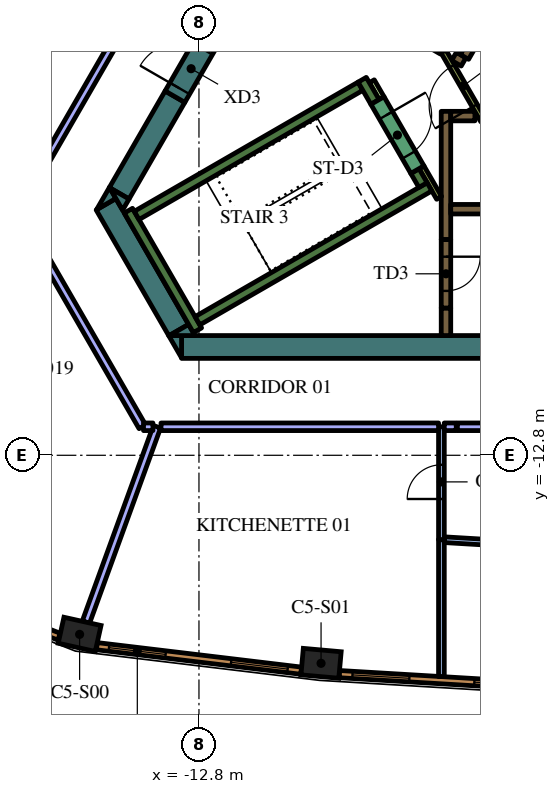
"""IFC4 building model, lengths in metres.
Left out: names, types, materials, properties, quantities, classifications, styles, units other than length and angle.
Written with IfcOpenShell. Run it as: python <this file> out.ifc"""

import sys

from ifc_helpers import new_model, si_unit, direction, frame, frame_2d, origin, origin_2d, place, context, subcontext, project, spatial, polyline, rectangle, outline, extrude, element, fill, save


model = new_model("IFC4")
c1 = context("Model", 3, precision=1e-05, world=origin(), true_north=direction((0.0, 1.0)))
c2 = subcontext(c1, "Body", "Model", "MODEL_VIEW")
j1 = project(units=[si_unit("LENGTHUNIT", "METRE"), si_unit("PLANEANGLEUNIT", "RADIAN")], contexts=[c1])
p1 = place(None, origin())
s1 = spatial("IfcSite", under=j1, at=p1, CompositionType="ELEMENT")
p2 = place(p1, origin())
s2 = spatial("IfcBuilding", under=s1, at=p2, CompositionType="ELEMENT")
p3 = place(p2, frame((0.0, 0.0, 279.6)))
s3 = spatial("IfcBuildingStorey", under=s2, at=p3, CompositionType="ELEMENT", Elevation=279.6)
for number, where, z_axis, x_axis in (
    (1, (-15.941, -17.512, 0.0), (0.0, 0.0, 1.0), (0.976, -0.217, 0.0)),
    (2, (-9.587, -18.274, 0.0), (0.0, 0.0, 1.0), (0.996, -0.089, 0.0)),
):
    element("IfcColumn", number, at=place(p3, frame(where, z_axis=z_axis, x_axis=x_axis)), inside=s3, PredefinedType="COLUMN", context=c2, shape_type="SweptSolid", body=[
        extrude(rectangle(XDim=1.0, YDim=0.7, at=origin_2d()), origin(), (0.0, 0.0, 1.0), 4.2),
    ])
p4 = place(p3, frame((8.904, -9.95, 0.0), z_axis=(0.0, 0.0, 1.0), x_axis=(-1.0, 0.0, 0.0)))
e3 = element("IfcWall", 3, at=p4, inside=s3, PredefinedType="SOLIDWALL", context=c2, shape_type="SweptSolid", body=[
    extrude(rectangle(XDim=22.161, YDim=0.6, at=frame_2d((11.081, 0.0))), origin(), (0.0, 0.0, 1.0), 4.2),
])
p5 = place(p3, origin())
e4 = element("IfcWall", 4, at=p5, inside=s3, PredefinedType="SOLIDWALL", context=c2, shape_type="SweptSolid", body=[
    extrude(outline(polyline([(-13.597, -9.65), (-13.259, -9.65), (-13.259, -10.236), (-13.597, -9.65)])), origin(), (0.0, 0.0, 1.0), 4.2),
])
p6 = place(p3, frame((-13.333, -9.506, 0.0), z_axis=(0.0, 0.0, 1.0), x_axis=(-0.500019073792, 0.866014391245, 0.0)))
e5 = element("IfcWall", 5, at=p6, inside=s3, PredefinedType="SOLIDWALL", context=c2, shape_type="SweptSolid", body=[
    extrude(rectangle(XDim=3.823, YDim=0.6, at=frame_2d((1.912, 0.0))), origin(), (0.0, 0.0, 1.0), 4.2),
])
e6 = element("IfcWall", 6, at=p5, inside=s3, PredefinedType="SOLIDWALL", context=c2, shape_type="SweptSolid", body=[
    extrude(outline(polyline([(-14.987, -6.043), (-15.493, -6.335), (-15.156, -5.75), (-14.987, -6.043)])), origin(), (0.0, 0.0, 1.0), 4.2),
])
e7 = element("IfcWall", 7, at=p5, inside=s3, PredefinedType="SOLIDWALL", context=c2, shape_type="SweptSolid", body=[
    extrude(outline(polyline([(-12.904, -9.65), (-13.58, -9.65), (-13.073, -9.357), (-12.904, -9.65)])), origin(), (0.0, 0.0, 1.0), 4.2),
])
p7 = place(p3, frame((-13.432, -3.364, 0.0), z_axis=(0.0, 0.0, 1.0), x_axis=(-0.499960127962, -0.866048422692, 0.0)))
e8 = element("IfcWall", 8, at=p7, inside=s3, PredefinedType="SOLIDWALL", context=c2, shape_type="SweptSolid", body=[
    extrude(rectangle(XDim=2.934, YDim=0.6, at=frame_2d((1.467, 0.0))), origin(), (0.0, 0.0, 1.0), 4.2),
])
e9 = element("IfcWall", 9, at=p5, inside=s3, PredefinedType="SOLIDWALL", context=c2, shape_type="SweptSolid", body=[
    extrude(outline(polyline([(-14.809, -6.35), (-15.147, -5.764), (-14.64, -6.057), (-14.809, -6.35)])), origin(), (0.0, 0.0, 1.0), 4.2),
])
p8 = place(p3, frame((-12.84, -9.511, 0.0), z_axis=(0.0, 0.0, 1.0), x_axis=(-0.499997733992, 0.866026712061, 0.0)))
e10 = element("IfcWall", 10, at=p8, inside=s3, PredefinedType="SOLIDWALL", context=c2, shape_type="SweptSolid", body=[
    extrude(rectangle(XDim=3.634, YDim=0.25, at=frame_2d((1.817, 0.0))), origin(), (0.0, 0.0, 1.0), 4.2),
])
p9 = place(p3, frame((-14.44, -6.49, 0.0), z_axis=(0.0, 0.0, 1.0), x_axis=(0.866022966069, 0.500004222222, 0.0)))
e11 = element("IfcWall", 11, at=p9, inside=s3, PredefinedType="SOLIDWALL", context=c2, shape_type="SweptSolid", body=[
    extrude(rectangle(XDim=6.8, YDim=0.25, at=frame_2d((3.4, 0.0))), origin(), (0.0, 0.0, 1.0), 4.2),
])
p10 = place(p3, frame((-8.168, -3.503, 0.0), z_axis=(0.0, 0.0, 1.0), x_axis=(-0.499952099219, 0.866053057547, 0.0)))
e12 = element("IfcWall", 12, at=p10, inside=s3, PredefinedType="SOLIDWALL", context=c2, shape_type="SweptSolid", body=[
    extrude(rectangle(XDim=0.675, YDim=0.25, at=frame_2d((0.337, 0.0))), origin(), (0.0, 0.0, 1.0), 4.2),
])
p11 = place(p3, frame((-12.84, -9.261, 0.0), z_axis=(0.0, 0.0, 1.0), x_axis=(0.866016039709, 0.500016218704, 0.0)))
e13 = element("IfcWall", 13, at=p11, inside=s3, PredefinedType="SOLIDWALL", context=c2, shape_type="SweptSolid", body=[
    extrude(rectangle(XDim=7.05, YDim=0.25, at=frame_2d((3.525, 0.0))), origin(), (0.0, 0.0, 1.0), 4.2),
])
p12 = place(p3, frame((-6.905, -5.69, 0.0), z_axis=(0.0, 0.0, 1.0), x_axis=(-0.500402024738, 0.865793170242, 0.0)))
e14 = element("IfcWall", 14, at=p12, inside=s3, PredefinedType="SOLIDWALL", context=c2, shape_type="SweptSolid", body=[
    extrude(rectangle(XDim=0.425, YDim=0.25, at=frame_2d((0.212, 0.0))), origin(), (0.0, 0.0, 1.0), 4.2),
])
p13 = place(p3, frame((-6.3, -7.125, 0.0), z_axis=(0.0, 0.0, 1.0), x_axis=(0.0, 1.0, 0.0)))
e15 = element("IfcWall", 15, at=p13, inside=s3, PredefinedType="SOLIDWALL", context=c2, shape_type="SweptSolid", body=[
    extrude(rectangle(XDim=3.375, YDim=0.25, at=frame_2d((1.687, 0.0))), origin(), (0.0, 0.0, 1.0), 4.2),
])
p14 = place(p3, frame((-6.175, -3.875, 0.0), z_axis=(0.0, 0.0, 1.0), x_axis=(1.0, 0.0, 0.0)))
e16 = element("IfcWall", 16, at=p14, inside=s3, PredefinedType="SOLIDWALL", context=c2, shape_type="SweptSolid", body=[
    extrude(rectangle(XDim=0.637, YDim=0.25, at=frame_2d((0.318, 0.0))), origin(), (0.0, 0.0, 1.0), 4.2),
])
p15 = place(p3, frame((-6.3, -8.925, 0.0), z_axis=(0.0, 0.0, 1.0), x_axis=(0.0, -1.0, 0.0)))
e17 = element("IfcWall", 17, at=p15, inside=s3, PredefinedType="SOLIDWALL", context=c2, shape_type="SweptSolid", body=[
    extrude(rectangle(XDim=0.725, YDim=0.25, at=frame_2d((0.363, 0.0))), origin(), (0.0, 0.0, 1.0), 4.2),
])
p16 = place(p3, frame((-6.088, -2.305, 0.0), z_axis=(0.0, 0.0, 1.0), x_axis=(0.866059450854, -0.499941024108, 0.0)))
e18 = element("IfcWall", 18, at=p16, inside=s3, PredefinedType="SOLIDWALL", context=c2, shape_type="SweptSolid", body=[
    extrude(rectangle(XDim=0.29, YDim=0.25, at=frame_2d((0.145, 0.0))), origin(), (0.0, 0.0, 1.0), 4.2),
])
p17 = place(p3, frame((-7.889, -1.265, 0.0), z_axis=(0.0, 0.0, 1.0), x_axis=(0.865986741702, -0.500066958712, 0.0)))
e19 = element("IfcWall", 19, at=p17, inside=s3, PredefinedType="SOLIDWALL", context=c2, shape_type="SweptSolid", body=[
    extrude(rectangle(XDim=1.738, YDim=0.25, at=frame_2d((0.869, 0.0))), origin(), (0.0, 0.0, 1.0), 4.2),
])
p18 = place(p3, frame((-8.252, -2.958, 0.0), z_axis=(0.0, 0.0, 1.0), x_axis=(0.500174715838, -0.865924508047, 0.0)))
e20 = element("IfcWall", 20, at=p18, inside=s3, PredefinedType="PARTITIONING", context=c2, shape_type="SweptSolid", body=[
    extrude(rectangle(XDim=0.514, YDim=0.15, at=frame_2d((0.257, 0.0))), origin(), (0.0, 0.0, 1.0), 3.55),
])
p19 = place(p3, frame((-6.48, -6.027, 0.0), z_axis=(0.0, 0.0, 1.0), x_axis=(-0.499927229454, 0.866067413802, 0.0)))
e21 = element("IfcWall", 21, at=p19, inside=s3, PredefinedType="PARTITIONING", context=c2, shape_type="SweptSolid", body=[
    extrude(rectangle(XDim=0.929, YDim=0.15, at=frame_2d((0.464, 0.0))), origin(), (0.0, 0.0, 1.0), 4.2),
])
p20 = place(p3, frame((-6.175, -6.325, 0.0), z_axis=(0.0, 0.0, 1.0), x_axis=(1.0, 0.0, 0.0)))
e22 = element("IfcWall", 22, at=p20, inside=s3, PredefinedType="SOLIDWALL", context=c2, shape_type="SweptSolid", body=[
    extrude(rectangle(XDim=12.35, YDim=0.25, at=frame_2d((6.175, 0.0))), origin(), (0.0, 0.0, 1.0), 4.2),
])
p21 = place(p20, frame((3.205, 0.0, 0.0)))
e23 = element("IfcOpeningElement", 23, at=p21, cuts=e22, PredefinedType="OPENING", context=c2, shape_type="SweptSolid", body=[
    extrude(rectangle(XDim=0.9, YDim=2.1, at=frame_2d((0.45, 1.05))), frame((0.0, 0.135, 0.0), z_axis=(0.0, -1.0, 0.0), x_axis=(1.0, 0.0, 0.0)), (0.0, 0.0, 1.0), 0.27),
])
p22 = place(p20, frame((8.145, 0.0, 0.0)))
e24 = element("IfcOpeningElement", 24, at=p22, cuts=e22, PredefinedType="OPENING", context=c2, shape_type="SweptSolid", body=[
    extrude(rectangle(XDim=1.1, YDim=2.1, at=frame_2d((0.55, 1.05))), frame((0.0, 0.135, 0.0), z_axis=(0.0, -1.0, 0.0), x_axis=(1.0, 0.0, 0.0)), (0.0, 0.0, 1.0), 0.27),
])
p23 = place(p20, frame((10.665, 0.0, 0.0)))
e25 = element("IfcOpeningElement", 25, at=p23, cuts=e22, PredefinedType="OPENING", context=c2, shape_type="SweptSolid", body=[
    extrude(rectangle(XDim=1.1, YDim=2.1, at=frame_2d((0.55, 1.05))), frame((0.0, 0.135, 0.0), z_axis=(0.0, -1.0, 0.0), x_axis=(1.0, 0.0, 0.0)), (0.0, 0.0, 1.0), 0.27),
])
p24 = place(p3, frame((-0.898, 6.194, 0.0), z_axis=(0.0, 0.0, 1.0), x_axis=(-0.499996202215, -0.866027596426, 0.0)))
e26 = element("IfcWall", 26, at=p24, inside=s3, PredefinedType="SOLIDWALL", context=c2, shape_type="SweptSolid", body=[
    extrude(rectangle(XDim=9.83, YDim=0.25, at=frame_2d((4.915, 0.0))), origin(), (0.0, 0.0, 1.0), 4.2),
])
p25 = place(p24, frame((0.585, 0.0, 0.0)))
e27 = element("IfcOpeningElement", 27, at=p25, cuts=e26, PredefinedType="OPENING", context=c2, shape_type="SweptSolid", body=[
    extrude(rectangle(XDim=1.1, YDim=2.1, at=frame_2d((0.55, 1.05))), frame((0.0, 0.135, 0.0), z_axis=(0.0, -1.0, 0.0), x_axis=(1.0, 0.0, 0.0)), (0.0, 0.0, 1.0), 0.27),
])
p26 = place(p24, frame((3.105, 0.0, 0.0)))
e28 = element("IfcOpeningElement", 28, at=p26, cuts=e26, PredefinedType="OPENING", context=c2, shape_type="SweptSolid", body=[
    extrude(rectangle(XDim=1.1, YDim=2.1, at=frame_2d((0.55, 1.05))), frame((0.0, 0.135, 0.0), z_axis=(0.0, -1.0, 0.0), x_axis=(1.0, 0.0, 0.0)), (0.0, 0.0, 1.0), 0.27),
])
p27 = place(p24, frame((5.625, 0.0, 0.0)))
e29 = element("IfcOpeningElement", 29, at=p27, cuts=e26, PredefinedType="OPENING", context=c2, shape_type="SweptSolid", body=[
    extrude(rectangle(XDim=1.1, YDim=2.1, at=frame_2d((0.55, 1.05))), frame((0.0, 0.135, 0.0), z_axis=(0.0, -1.0, 0.0), x_axis=(1.0, 0.0, 0.0)), (0.0, 0.0, 1.0), 0.27),
])
p28 = place(p24, frame((8.145, 0.0, 0.0)))
e30 = element("IfcOpeningElement", 30, at=p28, cuts=e26, PredefinedType="OPENING", context=c2, shape_type="SweptSolid", body=[
    extrude(rectangle(XDim=1.1, YDim=2.1, at=frame_2d((0.55, 1.05))), frame((0.0, 0.135, 0.0), z_axis=(0.0, -1.0, 0.0), x_axis=(1.0, 0.0, 0.0)), (0.0, 0.0, 1.0), 0.27),
])
p29 = place(p3, frame((-8.103, -3.466, 0.0), z_axis=(0.0, 0.0, 1.0), x_axis=(0.500078061341, -0.865980330357, 0.0)))
e31 = element("IfcWall", 31, at=p29, inside=s3, PredefinedType="SOLIDWALL", context=c2, shape_type="SweptSolid", body=[
    extrude(rectangle(XDim=2.1, YDim=0.4, at=frame_2d((1.05, 0.0))), origin(), (0.0, 0.0, 1.0), 4.2),
])
p30 = place(p29, frame((0.45, 0.0, 0.0)))
e32 = element("IfcOpeningElement", 32, at=p30, cuts=e31, PredefinedType="OPENING", context=c2, shape_type="SweptSolid", body=[
    extrude(rectangle(XDim=1.2, YDim=2.1, at=frame_2d((0.6, 1.05))), frame((0.0, 0.21, 0.0), z_axis=(0.0, -1.0, 0.0), x_axis=(1.0, 0.0, 0.0)), (0.0, 0.0, 1.0), 0.42),
])
p31 = place(p3, frame((-6.3, -7.125, 0.0), z_axis=(0.0, 0.0, 1.0), x_axis=(0.0, -1.0, 0.0)))
e33 = element("IfcWall", 33, at=p31, inside=s3, PredefinedType="SOLIDWALL", context=c2, shape_type="SweptSolid", body=[
    extrude(rectangle(XDim=1.8, YDim=0.25, at=frame_2d((0.9, 0.0))), origin(), (0.0, 0.0, 1.0), 4.2),
])
p32 = place(p31, frame((0.45, 0.0, 0.0)))
e34 = element("IfcOpeningElement", 34, at=p32, cuts=e33, PredefinedType="OPENING", context=c2, shape_type="SweptSolid", body=[
    extrude(rectangle(XDim=0.9, YDim=2.1, at=frame_2d((0.45, 1.05))), frame((0.0, 0.135, 0.0), z_axis=(0.0, -1.0, 0.0), x_axis=(1.0, 0.0, 0.0)), (0.0, 0.0, 1.0), 0.27),
])
p33 = place(p3, frame((-5.317, -3.99, 0.0), z_axis=(0.0, 0.0, 1.0), x_axis=(-0.500027713859, 0.866009402589, 0.0)))
e35 = element("IfcWall", 35, at=p33, inside=s3, PredefinedType="PARTITIONING", context=c2, shape_type="SweptSolid", body=[
    extrude(rectangle(XDim=2.1, YDim=0.15, at=frame_2d((1.05, 0.0))), origin(), (0.0, 0.0, 1.0), 4.2),
])
p34 = place(p33, frame((0.45, 0.0, 0.0)))
e36 = element("IfcOpeningElement", 36, at=p34, cuts=e35, PredefinedType="OPENING", context=c2, shape_type="SweptSolid", body=[
    extrude(rectangle(XDim=1.2, YDim=2.1, at=frame_2d((0.6, 1.05))), frame((0.0, 0.085, 0.0), z_axis=(0.0, -1.0, 0.0), x_axis=(1.0, 0.0, 0.0)), (0.0, 0.0, 1.0), 0.17),
])
p35 = place(p3, frame((-13.432, -3.364, 0.0), z_axis=(0.0, 0.0, 1.0), x_axis=(0.500000056704, 0.866025371046, 0.0)))
e37 = element("IfcWall", 37, at=p35, inside=s3, PredefinedType="SOLIDWALL", context=c2, shape_type="SweptSolid", body=[
    extrude(rectangle(XDim=1.7, YDim=0.6, at=frame_2d((0.85, 0.0))), origin(), (0.0, 0.0, 1.0), 4.2),
])
p36 = place(p35, frame((0.25, 0.0, 0.0)))
e38 = element("IfcOpeningElement", 38, at=p36, cuts=e37, PredefinedType="OPENING", context=c2, shape_type="SweptSolid", body=[
    extrude(rectangle(XDim=1.2, YDim=2.1, at=frame_2d((0.6, 1.05))), frame((0.0, 0.31, 0.0), z_axis=(0.0, -1.0, 0.0), x_axis=(1.0, 0.0, 0.0)), (0.0, 0.0, 1.0), 0.62),
])
p37 = place(p3, frame((-6.42, -15.013, 0.0), z_axis=(0.0, 0.0, 1.0), x_axis=(0.0, -1.0, 0.0)))
e39 = element("IfcWall", 39, at=p37, inside=s3, PredefinedType="PARTITIONING", context=c2, shape_type="SweptSolid", body=[
    extrude(rectangle(XDim=3.61, YDim=0.15, at=frame_2d((1.805, 0.0))), origin(), (0.0, 0.0, 1.0), 3.55),
])
p38 = place(p3, frame((-6.42, -15.021, 0.0), z_axis=(0.0, 0.0, 1.0), x_axis=(0.0, 1.0, 0.0)))
e40 = element("IfcWall", 40, at=p38, inside=s3, PredefinedType="PARTITIONING", context=c2, shape_type="SweptSolid", body=[
    extrude(rectangle(XDim=2.971, YDim=0.15, at=frame_2d((1.485, 0.0))), origin(), (0.0, 0.0, 1.0), 3.55),
])
p39 = place(p38, frame((1.071, 0.0, 0.0)))
e41 = element("IfcOpeningElement", 41, at=p39, cuts=e40, PredefinedType="OPENING", context=c2, shape_type="SweptSolid", body=[
    extrude(rectangle(XDim=0.9, YDim=2.1, at=frame_2d((0.45, 1.05))), frame((0.0, 0.085, 0.0), z_axis=(0.0, -1.0, 0.0), x_axis=(1.0, 0.0, 0.0)), (0.0, 0.0, 1.0), 0.17),
])
p40 = place(p3, frame((-15.774, -17.19, 0.0), z_axis=(0.0, 0.0, 1.0), x_axis=(0.341821907823, 0.93976474893, 0.0)))
e42 = element("IfcWall", 42, at=p40, inside=s3, PredefinedType="PARTITIONING", context=c2, shape_type="SweptSolid", body=[
    extrude(rectangle(XDim=5.469, YDim=0.2, at=frame_2d((2.735, 0.0))), origin(), (0.0, 0.0, 1.0), 3.55),
])
p41 = place(p3, frame((-13.799, -12.05, 0.0), z_axis=(0.0, 0.0, 1.0), x_axis=(1.0, 0.0, 0.0)))
e43 = element("IfcWall", 43, at=p41, inside=s3, PredefinedType="PARTITIONING", context=c2, shape_type="SweptSolid", body=[
    extrude(rectangle(XDim=7.303, YDim=0.2, at=frame_2d((3.652, 0.0))), origin(), (0.0, 0.0, 1.0), 3.55),
])
p42 = place(p3, frame((-6.345, -15.021, 0.0), z_axis=(0.0, 0.0, 1.0), x_axis=(0.998224081041, -0.059570832044, 0.0)))
e44 = element("IfcWall", 44, at=p42, inside=s3, PredefinedType="PARTITIONING", context=c2, shape_type="SweptSolid", body=[
    extrude(rectangle(XDim=3.254, YDim=0.15, at=frame_2d((1.627, 0.0))), origin(), (0.0, 0.0, 1.0), 3.55),
])
p43 = place(p3, frame((-6.0, -12.05, 0.0), z_axis=(0.0, 0.0, 1.0), x_axis=(1.0, 0.0, 0.0)))
e45 = element("IfcWall", 45, at=p43, inside=s3, PredefinedType="PARTITIONING", context=c2, shape_type="SweptSolid", body=[
    extrude(rectangle(XDim=12.0, YDim=0.2, at=frame_2d((6.0, 0.0))), origin(), (0.0, 0.0, 1.0), 3.55),
])
p44 = place(p43, frame((5.5, 0.0, 0.0)))
e46 = element("IfcOpeningElement", 46, at=p44, cuts=e45, PredefinedType="OPENING", context=c2, shape_type="SweptSolid", body=[
    extrude(rectangle(XDim=1.0, YDim=2.1, at=frame_2d((0.5, 1.05))), frame((0.0, 0.11, 0.0), z_axis=(0.0, -1.0, 0.0), x_axis=(1.0, 0.0, 0.0)), (0.0, 0.0, 1.0), 0.22),
])
p45 = place(p3, frame((-6.345, -12.05, 0.0), z_axis=(0.0, 0.0, 1.0), x_axis=(1.0, 0.0, 0.0)))
e47 = element("IfcWall", 47, at=p45, inside=s3, PredefinedType="PARTITIONING", context=c2, shape_type="SweptSolid", body=[
    extrude(rectangle(XDim=0.315, YDim=0.2, at=frame_2d((0.158, 0.0))), origin(), (0.0, 0.0, 1.0), 3.55),
])
p46 = place(p3, frame((-13.451, 0.803, 0.0), z_axis=(0.0, 0.0, 1.0), x_axis=(-0.499982585408, -0.86603545787, 0.0)))
e48 = element("IfcWall", 48, at=p46, inside=s3, PredefinedType="PARTITIONING", context=c2, shape_type="SweptSolid", body=[
    extrude(rectangle(XDim=8.26, YDim=0.2, at=frame_2d((4.13, 0.0))), origin(), (0.0, 0.0, 1.0), 3.55),
])
p47 = place(p3, frame((-17.218, -6.978, 0.0), z_axis=(0.0, 0.0, 1.0), x_axis=(0.500012299885, -0.866018302326, 0.0)))
e49 = element("IfcWall", 49, at=p47, inside=s3, PredefinedType="PARTITIONING", context=c2, shape_type="SweptSolid", body=[
    extrude(rectangle(XDim=5.857, YDim=0.2, at=frame_2d((2.929, 0.0))), origin(), (0.0, 0.0, 1.0), 3.55),
])
p48 = place(p3, frame((-14.26, -12.05, 0.0), z_axis=(0.0, 0.0, 1.0), x_axis=(1.0, 0.0, 0.0)))
e50 = element("IfcWall", 50, at=p48, inside=s3, PredefinedType="PARTITIONING", context=c2, shape_type="SweptSolid", body=[
    extrude(rectangle(XDim=0.248, YDim=0.2, at=frame_2d((0.124, 0.0))), origin(), (0.0, 0.0, 1.0), 3.55),
])
p49 = place(p3, frame((-15.487, -17.823, 0.0), z_axis=(0.0, 0.0, 1.0), x_axis=(0.992885582795, -0.119072328769, 0.0)))
e51 = element("IfcWall", 51, at=p49, inside=s3, PredefinedType="SOLIDWALL", context=c2, shape_type="SweptSolid", body=[
    extrude(rectangle(XDim=5.415, YDim=0.19, at=frame_2d((2.708, 0.0))), origin(), (0.0, 0.0, 1.0), 3.95),
])
p50 = place(p49, frame((0.323, 0.0, 0.6)))
e52 = element("IfcOpeningElement", 52, at=p50, cuts=e51, PredefinedType="OPENING", context=c2, shape_type="SweptSolid", body=[
    extrude(rectangle(XDim=1.5, YDim=2.85, at=frame_2d((0.75, 1.425))), frame((0.0, 0.105, 0.0), z_axis=(0.0, -1.0, 0.0), x_axis=(1.0, 0.0, 0.0)), (0.0, 0.0, 1.0), 0.21),
])
p51 = place(p49, frame((3.558, 0.0, 0.6)))
e53 = element("IfcOpeningElement", 53, at=p51, cuts=e51, PredefinedType="OPENING", context=c2, shape_type="SweptSolid", body=[
    extrude(rectangle(XDim=1.5, YDim=2.85, at=frame_2d((0.75, 1.425))), frame((0.0, 0.105, 0.0), z_axis=(0.0, -1.0, 0.0), x_axis=(1.0, 0.0, 0.0)), (0.0, 0.0, 1.0), 0.21),
])
p52 = place(p3, frame((-9.107, -18.558, 0.0), z_axis=(0.0, 0.0, 1.0), x_axis=(0.998221492823, -0.059614186786, 0.0)))
e54 = element("IfcWall", 54, at=p52, inside=s3, PredefinedType="SOLIDWALL", context=c2, shape_type="SweptSolid", body=[
    extrude(rectangle(XDim=5.406, YDim=0.19, at=frame_2d((2.703, 0.0))), origin(), (0.0, 0.0, 1.0), 3.95),
])
p53 = place(p52, frame((0.346, 0.0, 0.6)))
e55 = element("IfcOpeningElement", 55, at=p53, cuts=e54, PredefinedType="OPENING", context=c2, shape_type="SweptSolid", body=[
    extrude(rectangle(XDim=1.5, YDim=2.85, at=frame_2d((0.75, 1.425))), frame((0.0, 0.105, 0.0), z_axis=(0.0, -1.0, 0.0), x_axis=(1.0, 0.0, 0.0)), (0.0, 0.0, 1.0), 0.21),
])
p54 = place(p52, frame((3.559, 0.0, 0.6)))
e56 = element("IfcOpeningElement", 56, at=p54, cuts=e54, PredefinedType="OPENING", context=c2, shape_type="SweptSolid", body=[
    extrude(rectangle(XDim=1.5, YDim=2.85, at=frame_2d((0.75, 1.425))), frame((0.0, 0.105, 0.0), z_axis=(0.0, -1.0, 0.0), x_axis=(1.0, 0.0, 0.0)), (0.0, 0.0, 1.0), 0.21),
])
p55 = place(p3, frame((-19.496, -16.392, 0.0), z_axis=(0.0, 0.0, 1.0), x_axis=(0.93100888477, -0.364996515709, 0.0)))
e57 = element("IfcWall", 57, at=p55, inside=s3, PredefinedType="SOLIDWALL", context=c2, shape_type="SweptSolid", body=[
    extrude(rectangle(XDim=3.237, YDim=0.19, at=frame_2d((1.618, 0.0))), origin(), (0.0, 0.0, 1.0), 3.95),
])
p56 = place(p55, frame((1.068, 0.0, 0.6)))
e58 = element("IfcOpeningElement", 58, at=p56, cuts=e57, PredefinedType="OPENING", context=c2, shape_type="SweptSolid", body=[
    extrude(rectangle(XDim=1.1, YDim=2.85, at=frame_2d((0.55, 1.425))), frame((0.0, 0.105, 0.0), z_axis=(0.0, -1.0, 0.0), x_axis=(1.0, 0.0, 0.0)), (0.0, 0.0, 1.0), 0.21),
])
p57 = place(p30, origin())
e59 = element("IfcDoor", 59, at=p57, inside=s3, OperationType="SINGLE_SWING_LEFT", PredefinedType="DOOR", context=c2, shape_type="SweptSolid", body=[
    extrude(rectangle(XDim=1.2, YDim=2.1, at=frame_2d((0.6, 1.05))), frame((0.0, 0.025, 0.0), z_axis=(0.0, -1.0, 0.0), x_axis=(1.0, 0.0, 0.0)), (0.0, 0.0, 1.0), 0.05),
])
fill(e32, e59)
p58 = place(p32, origin())
e60 = element("IfcDoor", 60, at=p58, inside=s3, OperationType="SINGLE_SWING_LEFT", PredefinedType="DOOR", context=c2, shape_type="SweptSolid", body=[
    extrude(rectangle(XDim=0.9, YDim=2.1, at=frame_2d((0.45, 1.05))), frame((0.0, 0.025, 0.0), z_axis=(0.0, -1.0, 0.0), x_axis=(1.0, 0.0, 0.0)), (0.0, 0.0, 1.0), 0.05),
])
fill(e34, e60)
p59 = place(p34, origin())
e61 = element("IfcDoor", 61, at=p59, inside=s3, OperationType="SINGLE_SWING_LEFT", PredefinedType="DOOR", context=c2, shape_type="SweptSolid", body=[
    extrude(rectangle(XDim=1.2, YDim=2.1, at=frame_2d((0.6, 1.05))), frame((0.0, 0.025, 0.0), z_axis=(0.0, -1.0, 0.0), x_axis=(1.0, 0.0, 0.0)), (0.0, 0.0, 1.0), 0.05),
])
fill(e36, e61)
p60 = place(p36, origin())
e62 = element("IfcDoor", 62, at=p60, inside=s3, OperationType="SINGLE_SWING_LEFT", PredefinedType="DOOR", context=c2, shape_type="SweptSolid", body=[
    extrude(rectangle(XDim=1.2, YDim=2.1, at=frame_2d((0.6, 1.05))), frame((0.0, 0.025, 0.0), z_axis=(0.0, -1.0, 0.0), x_axis=(1.0, 0.0, 0.0)), (0.0, 0.0, 1.0), 0.05),
])
fill(e38, e62)
p61 = place(p39, origin())
e63 = element("IfcDoor", 63, at=p61, inside=s3, OperationType="SINGLE_SWING_RIGHT", PredefinedType="DOOR", context=c2, shape_type="SweptSolid", body=[
    extrude(rectangle(XDim=0.9, YDim=2.1, at=frame_2d((0.45, 1.05))), frame((0.0, 0.025, 0.0), z_axis=(0.0, -1.0, 0.0), x_axis=(1.0, 0.0, 0.0)), (0.0, 0.0, 1.0), 0.05),
])
fill(e41, e63)
p62 = place(p50, origin())
e64 = element("IfcWindow", 64, at=p62, inside=s3, PartitioningType="SINGLE_PANEL", PredefinedType="WINDOW", context=c2, shape_type="SweptSolid", body=[
    extrude(rectangle(XDim=1.5, YDim=2.85, at=frame_2d((0.75, 1.425))), frame((0.0, 0.045, 0.0), z_axis=(0.0, -1.0, 0.0), x_axis=(1.0, 0.0, 0.0)), (0.0, 0.0, 1.0), 0.06),
])
fill(e52, e64)
p63 = place(p51, origin())
e65 = element("IfcWindow", 65, at=p63, inside=s3, PartitioningType="SINGLE_PANEL", PredefinedType="WINDOW", context=c2, shape_type="SweptSolid", body=[
    extrude(rectangle(XDim=1.5, YDim=2.85, at=frame_2d((0.75, 1.425))), frame((0.0, 0.045, 0.0), z_axis=(0.0, -1.0, 0.0), x_axis=(1.0, 0.0, 0.0)), (0.0, 0.0, 1.0), 0.06),
])
fill(e53, e65)
p64 = place(p53, origin())
e66 = element("IfcWindow", 66, at=p64, inside=s3, PartitioningType="SINGLE_PANEL", PredefinedType="WINDOW", context=c2, shape_type="SweptSolid", body=[
    extrude(rectangle(XDim=1.5, YDim=2.85, at=frame_2d((0.75, 1.425))), frame((0.0, 0.045, 0.0), z_axis=(0.0, -1.0, 0.0), x_axis=(1.0, 0.0, 0.0)), (0.0, 0.0, 1.0), 0.06),
])
fill(e55, e66)
p65 = place(p54, origin())
e67 = element("IfcWindow", 67, at=p65, inside=s3, PartitioningType="SINGLE_PANEL", PredefinedType="WINDOW", context=c2, shape_type="SweptSolid", body=[
    extrude(rectangle(XDim=1.5, YDim=2.85, at=frame_2d((0.75, 1.425))), frame((0.0, 0.045, 0.0), z_axis=(0.0, -1.0, 0.0), x_axis=(1.0, 0.0, 0.0)), (0.0, 0.0, 1.0), 0.06),
])
fill(e56, e67)
save(model, sys.argv[1])
